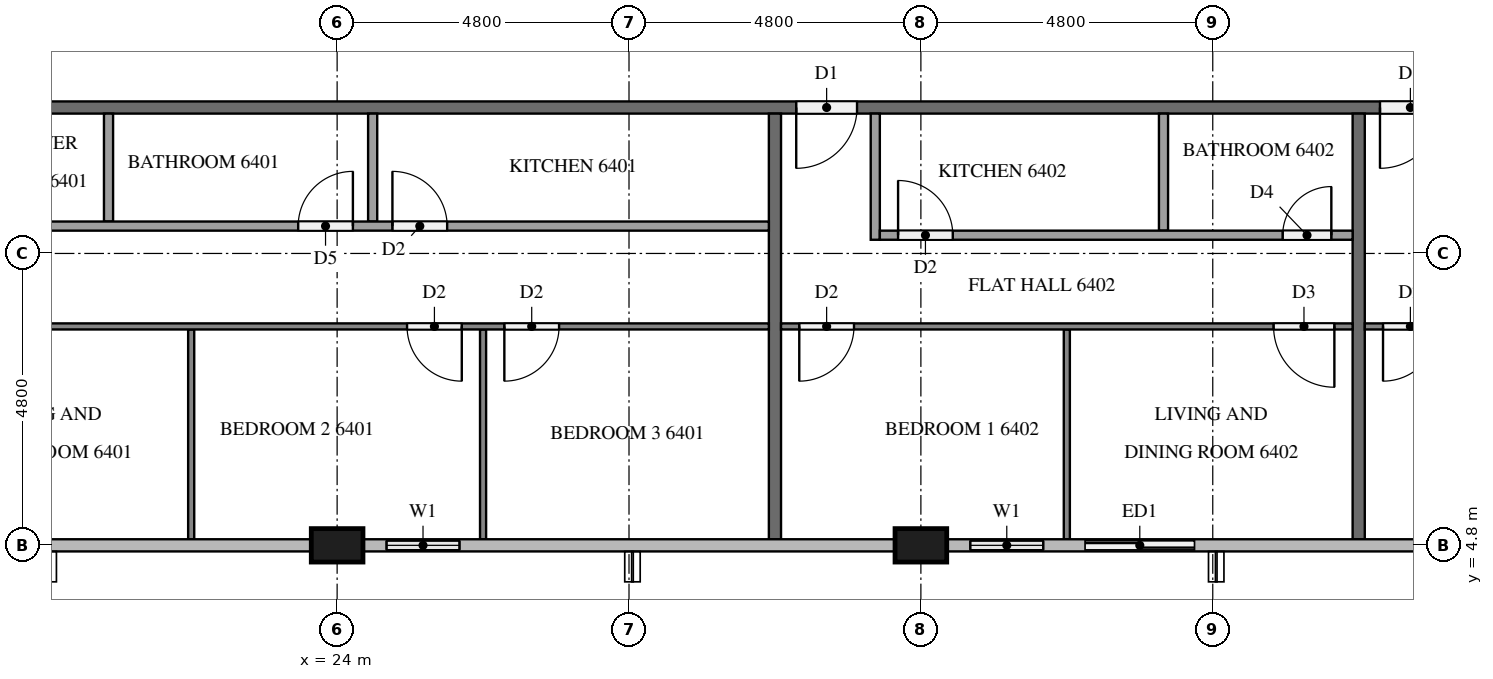
"""IFC4 building model, lengths in metres.
Left out: names, types, materials, properties, quantities, classifications, styles, units other than length and angle.
Written with IfcOpenShell. Run it as: python <this file> out.ifc"""

import sys

from ifc_helpers import new_model, si_unit, direction, frame, frame_2d, origin, origin_2d, place, context, subcontext, project, spatial, rectangle, extrude, element, fill, save


model = new_model("IFC4")
c1 = context("Model", 3, precision=1e-05, world=origin(), true_north=direction((0.0, 1.0)))
c2 = subcontext(c1, "Body", "Model", "MODEL_VIEW")
j1 = project(units=[si_unit("LENGTHUNIT", "METRE"), si_unit("PLANEANGLEUNIT", "RADIAN")], contexts=[c1])
p1 = place(None, origin())
s1 = spatial("IfcSite", under=j1, at=p1, CompositionType="ELEMENT")
p2 = place(p1, origin())
s2 = spatial("IfcBuilding", under=s1, at=p2, CompositionType="ELEMENT")
p3 = place(p2, frame((0.0, 0.0, 245.7)))
s3 = spatial("IfcBuildingStorey", under=s2, at=p3, CompositionType="ELEMENT", Elevation=245.7)
for number, where, z_axis, x_axis in (
    (1, (24.0, 4.8, 0.0), (0.0, 0.0, 1.0), (1.0, 0.0, 0.0)),
    (2, (33.6, 4.8, 0.0), (0.0, 0.0, 1.0), (1.0, 0.0, 0.0)),
):
    element("IfcColumn", number, at=place(p3, frame(where, z_axis=z_axis, x_axis=x_axis)), inside=s3, PredefinedType="COLUMN", context=c2, shape_type="SweptSolid", body=[
        extrude(rectangle(XDim=0.85, YDim=0.55, at=origin_2d()), origin(), (0.0, 0.0, 1.0), 3.2),
    ])
p4 = place(p3, frame((24.425, 4.8, 0.0), z_axis=(0.0, 0.0, 1.0), x_axis=(1.0, 0.0, 0.0)))
e3 = element("IfcWall", 3, at=p4, inside=s3, PredefinedType="SOLIDWALL", context=c2, shape_type="SweptSolid", body=[
    extrude(rectangle(XDim=1.975, YDim=0.15, at=frame_2d((0.987, 0.0))), origin(), (0.0, 0.0, 1.0), 3.2),
])
p5 = place(p4, frame((0.387, 0.0, 0.9)))
e4 = element("IfcOpeningElement", 4, at=p5, cuts=e3, PredefinedType="OPENING", context=c2, shape_type="SweptSolid", body=[
    extrude(rectangle(XDim=1.2, YDim=1.4, at=frame_2d((0.6, 0.7))), frame((0.0, 0.085, 0.0), z_axis=(0.0, -1.0, 0.0), x_axis=(1.0, 0.0, 0.0)), (0.0, 0.0, 1.0), 0.17),
])
p6 = place(p3, frame((34.025, 4.8, 0.0), z_axis=(0.0, 0.0, 1.0), x_axis=(1.0, 0.0, 0.0)))
e5 = element("IfcWall", 5, at=p6, inside=s3, PredefinedType="SOLIDWALL", context=c2, shape_type="SweptSolid", body=[
    extrude(rectangle(XDim=4.375, YDim=0.15, at=frame_2d((2.188, 0.0))), origin(), (0.0, 0.0, 1.0), 3.2),
])
p7 = place(p6, frame((0.387, 0.0, 0.9)))
e6 = element("IfcOpeningElement", 6, at=p7, cuts=e5, PredefinedType="OPENING", context=c2, shape_type="SweptSolid", body=[
    extrude(rectangle(XDim=1.2, YDim=1.4, at=frame_2d((0.6, 0.7))), frame((0.0, 0.085, 0.0), z_axis=(0.0, -1.0, 0.0), x_axis=(1.0, 0.0, 0.0)), (0.0, 0.0, 1.0), 0.17),
])
p8 = place(p6, frame((2.275, 0.0, 0.0)))
e7 = element("IfcOpeningElement", 7, at=p8, cuts=e5, PredefinedType="OPENING", context=c2, shape_type="SweptSolid", body=[
    extrude(rectangle(XDim=1.8, YDim=2.4, at=frame_2d((0.9, 1.2))), frame((0.0, 0.085, 0.0), z_axis=(0.0, -1.0, 0.0), x_axis=(1.0, 0.0, 0.0)), (0.0, 0.0, 1.0), 0.17),
])
p9 = place(p3, frame((50.5, 12.0, 0.0), z_axis=(0.0, 0.0, 1.0), x_axis=(-1.0, 0.0, 0.0)))
e8 = element("IfcWall", 8, at=p9, inside=s3, PredefinedType="PARTITIONING", context=c2, shape_type="SweptSolid", body=[
    extrude(rectangle(XDim=38.6, YDim=0.2, at=frame_2d((19.3, 0.0))), origin(), (0.0, 0.0, 1.0), 3.2),
])
p10 = place(p9, frame((37.1, 0.0, 0.0)))
e9 = element("IfcOpeningElement", 9, at=p10, cuts=e8, PredefinedType="OPENING", context=c2, shape_type="SweptSolid", body=[
    extrude(rectangle(XDim=1.1, YDim=2.1, at=frame_2d((0.55, 1.05))), frame((0.0, 0.11, 0.0), z_axis=(0.0, -1.0, 0.0), x_axis=(1.0, 0.0, 0.0)), (0.0, 0.0, 1.0), 0.22),
])
p11 = place(p9, frame((17.95, 0.0, 0.0)))
e10 = element("IfcOpeningElement", 10, at=p11, cuts=e8, PredefinedType="OPENING", context=c2, shape_type="SweptSolid", body=[
    extrude(rectangle(XDim=1.0, YDim=2.1, at=frame_2d((0.5, 1.05))), frame((0.0, 0.11, 0.0), z_axis=(0.0, -1.0, 0.0), x_axis=(1.0, 0.0, 0.0)), (0.0, 0.0, 1.0), 0.22),
])
p12 = place(p9, frame((8.35, 0.0, 0.0)))
e11 = element("IfcOpeningElement", 11, at=p12, cuts=e8, PredefinedType="OPENING", context=c2, shape_type="SweptSolid", body=[
    extrude(rectangle(XDim=1.0, YDim=2.1, at=frame_2d((0.5, 1.05))), frame((0.0, 0.11, 0.0), z_axis=(0.0, -1.0, 0.0), x_axis=(1.0, 0.0, 0.0)), (0.0, 0.0, 1.0), 0.22),
])
for number, where, z_axis, x_axis in (
    (12, (31.2, 11.9, 0.0), (0.0, 0.0, 1.0), (0.0, -1.0, 0.0)),
    (13, (40.8, 11.9, 0.0), (0.0, 0.0, 1.0), (0.0, -1.0, 0.0)),
):
    element("IfcWall", number, at=place(p3, frame(where, z_axis=z_axis, x_axis=x_axis)), inside=s3, PredefinedType="PARTITIONING", context=c2, shape_type="SweptSolid", body=[
        extrude(rectangle(XDim=7.0, YDim=0.2, at=frame_2d((3.5, 0.0))), origin(), (0.0, 0.0, 1.0), 3.2),
    ])
for number, where, z_axis, x_axis in (
    (14, (21.6, 8.35, 0.0), (0.0, 0.0, 1.0), (0.0, -1.0, 0.0)),
    (15, (26.4, 8.35, 0.0), (0.0, 0.0, 1.0), (0.0, -1.0, 0.0)),
):
    element("IfcWall", number, at=place(p3, frame(where, z_axis=z_axis, x_axis=x_axis)), inside=s3, PredefinedType="PARTITIONING", context=c2, shape_type="SweptSolid", body=[
        extrude(rectangle(XDim=3.45, YDim=0.1, at=frame_2d((1.725, 0.0))), origin(), (0.0, 0.0, 1.0), 3.2),
    ])
p13 = place(p3, frame((31.1, 8.4, 0.0), z_axis=(0.0, 0.0, 1.0), x_axis=(-1.0, 0.0, 0.0)))
e16 = element("IfcWall", 16, at=p13, inside=s3, PredefinedType="PARTITIONING", context=c2, shape_type="SweptSolid", body=[
    extrude(rectangle(XDim=19.0, YDim=0.1, at=frame_2d((9.5, 0.0))), origin(), (0.0, 0.0, 1.0), 3.2),
])
p14 = place(p13, frame((14.65, 0.0, 0.0)))
e17 = element("IfcOpeningElement", 17, at=p14, cuts=e16, PredefinedType="OPENING", context=c2, shape_type="SweptSolid", body=[
    extrude(rectangle(XDim=0.9, YDim=2.1, at=frame_2d((0.45, 1.05))), frame((0.0, 0.06, 0.0), z_axis=(0.0, -1.0, 0.0), x_axis=(1.0, 0.0, 0.0)), (0.0, 0.0, 1.0), 0.12),
])
p15 = place(p13, frame((12.95, 0.0, 0.0)))
e18 = element("IfcOpeningElement", 18, at=p15, cuts=e16, PredefinedType="OPENING", context=c2, shape_type="SweptSolid", body=[
    extrude(rectangle(XDim=1.0, YDim=2.1, at=frame_2d((0.5, 1.05))), frame((0.0, 0.06, 0.0), z_axis=(0.0, -1.0, 0.0), x_axis=(1.0, 0.0, 0.0)), (0.0, 0.0, 1.0), 0.12),
])
p16 = place(p13, frame((5.05, 0.0, 0.0)))
e19 = element("IfcOpeningElement", 19, at=p16, cuts=e16, PredefinedType="OPENING", context=c2, shape_type="SweptSolid", body=[
    extrude(rectangle(XDim=0.9, YDim=2.1, at=frame_2d((0.45, 1.05))), frame((0.0, 0.06, 0.0), z_axis=(0.0, -1.0, 0.0), x_axis=(1.0, 0.0, 0.0)), (0.0, 0.0, 1.0), 0.12),
])
p17 = place(p13, frame((3.45, 0.0, 0.0)))
e20 = element("IfcOpeningElement", 20, at=p17, cuts=e16, PredefinedType="OPENING", context=c2, shape_type="SweptSolid", body=[
    extrude(rectangle(XDim=0.9, YDim=2.1, at=frame_2d((0.45, 1.05))), frame((0.0, 0.06, 0.0), z_axis=(0.0, -1.0, 0.0), x_axis=(1.0, 0.0, 0.0)), (0.0, 0.0, 1.0), 0.12),
])
for number, where, z_axis, x_axis in (
    (21, (20.24, 11.9, 0.0), (0.0, 0.0, 1.0), (0.0, -1.0, 0.0)),
    (22, (24.584, 11.9, 0.0), (0.0, 0.0, 1.0), (0.0, -1.0, 0.0)),
):
    element("IfcWall", number, at=place(p3, frame(where, z_axis=z_axis, x_axis=x_axis)), inside=s3, PredefinedType="PARTITIONING", context=c2, shape_type="SweptSolid", body=[
        extrude(rectangle(XDim=1.775, YDim=0.15, at=frame_2d((0.887, 0.0))), origin(), (0.0, 0.0, 1.0), 3.2),
    ])
p18 = place(p3, frame((13.725, 10.05, 0.0), z_axis=(0.0, 0.0, 1.0), x_axis=(1.0, 0.0, 0.0)))
e23 = element("IfcWall", 23, at=p18, inside=s3, PredefinedType="PARTITIONING", context=c2, shape_type="SweptSolid", body=[
    extrude(rectangle(XDim=17.375, YDim=0.15, at=frame_2d((8.688, 0.0))), origin(), (0.0, 0.0, 1.0), 3.2),
])
p19 = place(p18, frame((2.133, 0.0, 0.0)))
e24 = element("IfcOpeningElement", 24, at=p19, cuts=e23, PredefinedType="OPENING", context=c2, shape_type="SweptSolid", body=[
    extrude(rectangle(XDim=0.8, YDim=2.1, at=frame_2d((0.4, 1.05))), frame((0.0, 0.085, 0.0), z_axis=(0.0, -1.0, 0.0), x_axis=(1.0, 0.0, 0.0)), (0.0, 0.0, 1.0), 0.17),
])
p20 = place(p18, frame((3.583, 0.0, 0.0)))
e25 = element("IfcOpeningElement", 25, at=p20, cuts=e23, PredefinedType="OPENING", context=c2, shape_type="SweptSolid", body=[
    extrude(rectangle(XDim=0.8, YDim=2.1, at=frame_2d((0.4, 1.05))), frame((0.0, 0.085, 0.0), z_axis=(0.0, -1.0, 0.0), x_axis=(1.0, 0.0, 0.0)), (0.0, 0.0, 1.0), 0.17),
])
p21 = place(p18, frame((9.635, 0.0, 0.0)))
e26 = element("IfcOpeningElement", 26, at=p21, cuts=e23, PredefinedType="OPENING", context=c2, shape_type="SweptSolid", body=[
    extrude(rectangle(XDim=0.9, YDim=2.1, at=frame_2d((0.45, 1.05))), frame((0.0, 0.085, 0.0), z_axis=(0.0, -1.0, 0.0), x_axis=(1.0, 0.0, 0.0)), (0.0, 0.0, 1.0), 0.17),
])
p22 = place(p18, frame((11.184, 0.0, 0.0)))
e27 = element("IfcOpeningElement", 27, at=p22, cuts=e23, PredefinedType="OPENING", context=c2, shape_type="SweptSolid", body=[
    extrude(rectangle(XDim=0.9, YDim=2.1, at=frame_2d((0.45, 1.05))), frame((0.0, 0.085, 0.0), z_axis=(0.0, -1.0, 0.0), x_axis=(1.0, 0.0, 0.0)), (0.0, 0.0, 1.0), 0.17),
])
p23 = place(p3, frame((36.0, 8.35, 0.0), z_axis=(0.0, 0.0, 1.0), x_axis=(0.0, -1.0, 0.0)))
e28 = element("IfcWall", 28, at=p23, inside=s3, PredefinedType="PARTITIONING", context=c2, shape_type="SweptSolid", body=[
    extrude(rectangle(XDim=3.45, YDim=0.1, at=frame_2d((1.725, 0.0))), origin(), (0.0, 0.0, 1.0), 3.2),
])
p24 = place(p3, frame((40.7, 8.4, 0.0), z_axis=(0.0, 0.0, 1.0), x_axis=(-1.0, 0.0, 0.0)))
e29 = element("IfcWall", 29, at=p24, inside=s3, PredefinedType="PARTITIONING", context=c2, shape_type="SweptSolid", body=[
    extrude(rectangle(XDim=9.4, YDim=0.1, at=frame_2d((4.7, 0.0))), origin(), (0.0, 0.0, 1.0), 3.2),
])
p25 = place(p24, frame((8.2, 0.0, 0.0)))
e30 = element("IfcOpeningElement", 30, at=p25, cuts=e29, PredefinedType="OPENING", context=c2, shape_type="SweptSolid", body=[
    extrude(rectangle(XDim=0.9, YDim=2.1, at=frame_2d((0.45, 1.05))), frame((0.0, 0.06, 0.0), z_axis=(0.0, -1.0, 0.0), x_axis=(1.0, 0.0, 0.0)), (0.0, 0.0, 1.0), 0.12),
])
p26 = place(p24, frame((0.3, 0.0, 0.0)))
e31 = element("IfcOpeningElement", 31, at=p26, cuts=e29, PredefinedType="OPENING", context=c2, shape_type="SweptSolid", body=[
    extrude(rectangle(XDim=1.0, YDim=2.1, at=frame_2d((0.5, 1.05))), frame((0.0, 0.06, 0.0), z_axis=(0.0, -1.0, 0.0), x_axis=(1.0, 0.0, 0.0)), (0.0, 0.0, 1.0), 0.12),
])
p27 = place(p3, frame((37.59, 11.9, 0.0), z_axis=(0.0, 0.0, 1.0), x_axis=(0.0, -1.0, 0.0)))
e32 = element("IfcWall", 32, at=p27, inside=s3, PredefinedType="PARTITIONING", context=c2, shape_type="SweptSolid", body=[
    extrude(rectangle(XDim=1.925, YDim=0.15, at=frame_2d((0.962, 0.0))), origin(), (0.0, 0.0, 1.0), 3.2),
])
p28 = place(p3, frame((32.85, 11.9, 0.0), z_axis=(0.0, 0.0, 1.0), x_axis=(0.0, -1.0, 0.0)))
e33 = element("IfcWall", 33, at=p28, inside=s3, PredefinedType="PARTITIONING", context=c2, shape_type="SweptSolid", body=[
    extrude(rectangle(XDim=2.075, YDim=0.15, at=frame_2d((1.038, 0.0))), origin(), (0.0, 0.0, 1.0), 3.2),
])
p29 = place(p3, frame((32.925, 9.9, 0.0), z_axis=(0.0, 0.0, 1.0), x_axis=(1.0, 0.0, 0.0)))
e34 = element("IfcWall", 34, at=p29, inside=s3, PredefinedType="PARTITIONING", context=c2, shape_type="SweptSolid", body=[
    extrude(rectangle(XDim=7.775, YDim=0.15, at=frame_2d((3.887, 0.0))), origin(), (0.0, 0.0, 1.0), 3.2),
])
p30 = place(p29, frame((0.3, 0.0, 0.0)))
e35 = element("IfcOpeningElement", 35, at=p30, cuts=e34, PredefinedType="OPENING", context=c2, shape_type="SweptSolid", body=[
    extrude(rectangle(XDim=0.9, YDim=2.1, at=frame_2d((0.45, 1.05))), frame((0.0, 0.085, 0.0), z_axis=(0.0, -1.0, 0.0), x_axis=(1.0, 0.0, 0.0)), (0.0, 0.0, 1.0), 0.17),
])
p31 = place(p29, frame((6.625, 0.0, 0.0)))
e36 = element("IfcOpeningElement", 36, at=p31, cuts=e34, PredefinedType="OPENING", context=c2, shape_type="SweptSolid", body=[
    extrude(rectangle(XDim=0.8, YDim=2.1, at=frame_2d((0.4, 1.05))), frame((0.0, 0.085, 0.0), z_axis=(0.0, -1.0, 0.0), x_axis=(1.0, 0.0, 0.0)), (0.0, 0.0, 1.0), 0.17),
])
p32 = place(p3, frame((57.178, 8.4, 0.0), z_axis=(0.0, 0.0, 1.0), x_axis=(-1.0, 0.0, 0.0)))
e37 = element("IfcWall", 37, at=p32, inside=s3, PredefinedType="PARTITIONING", context=c2, shape_type="SweptSolid", body=[
    extrude(rectangle(XDim=16.279, YDim=0.1, at=frame_2d((8.139, 0.0))), origin(), (0.0, 0.0, 1.0), 3.2),
])
p33 = place(p32, frame((15.079, 0.0, 0.0)))
e38 = element("IfcOpeningElement", 38, at=p33, cuts=e37, PredefinedType="OPENING", context=c2, shape_type="SweptSolid", body=[
    extrude(rectangle(XDim=0.9, YDim=2.1, at=frame_2d((0.45, 1.05))), frame((0.0, 0.06, 0.0), z_axis=(0.0, -1.0, 0.0), x_axis=(1.0, 0.0, 0.0)), (0.0, 0.0, 1.0), 0.12),
])
p34 = place(p32, frame((7.128, 0.0, 0.0)))
e39 = element("IfcOpeningElement", 39, at=p34, cuts=e37, PredefinedType="OPENING", context=c2, shape_type="SweptSolid", body=[
    extrude(rectangle(XDim=0.9, YDim=2.1, at=frame_2d((0.45, 1.05))), frame((0.0, 0.06, 0.0), z_axis=(0.0, -1.0, 0.0), x_axis=(1.0, 0.0, 0.0)), (0.0, 0.0, 1.0), 0.12),
])
p35 = place(p32, frame((5.428, 0.0, 0.0)))
e40 = element("IfcOpeningElement", 40, at=p35, cuts=e37, PredefinedType="OPENING", context=c2, shape_type="SweptSolid", body=[
    extrude(rectangle(XDim=1.0, YDim=2.1, at=frame_2d((0.5, 1.05))), frame((0.0, 0.06, 0.0), z_axis=(0.0, -1.0, 0.0), x_axis=(1.0, 0.0, 0.0)), (0.0, 0.0, 1.0), 0.12),
])
p36 = place(p5, origin())
e41 = element("IfcWindow", 41, at=p36, inside=s3, PartitioningType="SINGLE_PANEL", PredefinedType="WINDOW", context=c2, shape_type="SweptSolid", body=[
    extrude(rectangle(XDim=1.2, YDim=1.4, at=frame_2d((0.6, 0.7))), frame((0.0, 0.03, 0.0), z_axis=(0.0, -1.0, 0.0), x_axis=(1.0, 0.0, 0.0)), (0.0, 0.0, 1.0), 0.06),
])
fill(e4, e41)
p37 = place(p7, origin())
e42 = element("IfcWindow", 42, at=p37, inside=s3, PartitioningType="SINGLE_PANEL", PredefinedType="WINDOW", context=c2, shape_type="SweptSolid", body=[
    extrude(rectangle(XDim=1.2, YDim=1.4, at=frame_2d((0.6, 0.7))), frame((0.0, 0.03, 0.0), z_axis=(0.0, -1.0, 0.0), x_axis=(1.0, 0.0, 0.0)), (0.0, 0.0, 1.0), 0.06),
])
fill(e6, e42)
p38 = place(p8, origin())
e43 = element("IfcDoor", 43, at=p38, inside=s3, OperationType="SLIDING_TO_RIGHT", PredefinedType="DOOR", context=c2, shape_type="SweptSolid", body=[
    extrude(rectangle(XDim=1.8, YDim=2.4, at=frame_2d((0.9, 1.2))), frame((0.0, 0.025, 0.0), z_axis=(0.0, -1.0, 0.0), x_axis=(1.0, 0.0, 0.0)), (0.0, 0.0, 1.0), 0.05),
])
fill(e7, e43)
p39 = place(p11, origin())
e44 = element("IfcDoor", 44, at=p39, inside=s3, OperationType="SINGLE_SWING_RIGHT", PredefinedType="DOOR", context=c2, shape_type="SweptSolid", body=[
    extrude(rectangle(XDim=1.0, YDim=2.1, at=frame_2d((0.5, 1.05))), frame((0.0, 0.025, 0.0), z_axis=(0.0, -1.0, 0.0), x_axis=(1.0, 0.0, 0.0)), (0.0, 0.0, 1.0), 0.05),
])
fill(e10, e44)
p40 = place(p12, origin())
e45 = element("IfcDoor", 45, at=p40, inside=s3, OperationType="SINGLE_SWING_RIGHT", PredefinedType="DOOR", context=c2, shape_type="SweptSolid", body=[
    extrude(rectangle(XDim=1.0, YDim=2.1, at=frame_2d((0.5, 1.05))), frame((0.0, 0.025, 0.0), z_axis=(0.0, -1.0, 0.0), x_axis=(1.0, 0.0, 0.0)), (0.0, 0.0, 1.0), 0.05),
])
fill(e11, e45)
p41 = place(p16, origin())
e46 = element("IfcDoor", 46, at=p41, inside=s3, OperationType="SINGLE_SWING_LEFT", PredefinedType="DOOR", context=c2, shape_type="SweptSolid", body=[
    extrude(rectangle(XDim=0.9, YDim=2.1, at=frame_2d((0.45, 1.05))), frame((0.0, 0.025, 0.0), z_axis=(0.0, -1.0, 0.0), x_axis=(1.0, 0.0, 0.0)), (0.0, 0.0, 1.0), 0.05),
])
fill(e19, e46)
p42 = place(p17, origin())
e47 = element("IfcDoor", 47, at=p42, inside=s3, OperationType="SINGLE_SWING_RIGHT", PredefinedType="DOOR", context=c2, shape_type="SweptSolid", body=[
    extrude(rectangle(XDim=0.9, YDim=2.1, at=frame_2d((0.45, 1.05))), frame((0.0, 0.025, 0.0), z_axis=(0.0, -1.0, 0.0), x_axis=(1.0, 0.0, 0.0)), (0.0, 0.0, 1.0), 0.05),
])
fill(e20, e47)
p43 = place(p21, origin())
e48 = element("IfcDoor", 48, at=p43, inside=s3, OperationType="SINGLE_SWING_RIGHT", PredefinedType="DOOR", context=c2, shape_type="SweptSolid", body=[
    extrude(rectangle(XDim=0.9, YDim=2.1, at=frame_2d((0.45, 1.05))), frame((0.0, 0.025, 0.0), z_axis=(0.0, -1.0, 0.0), x_axis=(1.0, 0.0, 0.0)), (0.0, 0.0, 1.0), 0.05),
])
fill(e26, e48)
p44 = place(p22, origin())
e49 = element("IfcDoor", 49, at=p44, inside=s3, OperationType="SINGLE_SWING_LEFT", PredefinedType="DOOR", context=c2, shape_type="SweptSolid", body=[
    extrude(rectangle(XDim=0.9, YDim=2.1, at=frame_2d((0.45, 1.05))), frame((0.0, 0.025, 0.0), z_axis=(0.0, -1.0, 0.0), x_axis=(1.0, 0.0, 0.0)), (0.0, 0.0, 1.0), 0.05),
])
fill(e27, e49)
p45 = place(p25, origin())
e50 = element("IfcDoor", 50, at=p45, inside=s3, OperationType="SINGLE_SWING_RIGHT", PredefinedType="DOOR", context=c2, shape_type="SweptSolid", body=[
    extrude(rectangle(XDim=0.9, YDim=2.1, at=frame_2d((0.45, 1.05))), frame((0.0, 0.025, 0.0), z_axis=(0.0, -1.0, 0.0), x_axis=(1.0, 0.0, 0.0)), (0.0, 0.0, 1.0), 0.05),
])
fill(e30, e50)
p46 = place(p26, origin())
e51 = element("IfcDoor", 51, at=p46, inside=s3, OperationType="SINGLE_SWING_LEFT", PredefinedType="DOOR", context=c2, shape_type="SweptSolid", body=[
    extrude(rectangle(XDim=1.0, YDim=2.1, at=frame_2d((0.5, 1.05))), frame((0.0, 0.025, 0.0), z_axis=(0.0, -1.0, 0.0), x_axis=(1.0, 0.0, 0.0)), (0.0, 0.0, 1.0), 0.05),
])
fill(e31, e51)
p47 = place(p30, origin())
e52 = element("IfcDoor", 52, at=p47, inside=s3, OperationType="SINGLE_SWING_LEFT", PredefinedType="DOOR", context=c2, shape_type="SweptSolid", body=[
    extrude(rectangle(XDim=0.9, YDim=2.1, at=frame_2d((0.45, 1.05))), frame((0.0, 0.025, 0.0), z_axis=(0.0, -1.0, 0.0), x_axis=(1.0, 0.0, 0.0)), (0.0, 0.0, 1.0), 0.05),
])
fill(e35, e52)
p48 = place(p31, origin())
e53 = element("IfcDoor", 53, at=p48, inside=s3, OperationType="SINGLE_SWING_RIGHT", PredefinedType="DOOR", context=c2, shape_type="SweptSolid", body=[
    extrude(rectangle(XDim=0.8, YDim=2.1, at=frame_2d((0.4, 1.05))), frame((0.0, 0.025, 0.0), z_axis=(0.0, -1.0, 0.0), x_axis=(1.0, 0.0, 0.0)), (0.0, 0.0, 1.0), 0.05),
])
fill(e36, e53)
p49 = place(p33, origin())
e54 = element("IfcDoor", 54, at=p49, inside=s3, OperationType="SINGLE_SWING_RIGHT", PredefinedType="DOOR", context=c2, shape_type="SweptSolid", body=[
    extrude(rectangle(XDim=0.9, YDim=2.1, at=frame_2d((0.45, 1.05))), frame((0.0, 0.025, 0.0), z_axis=(0.0, -1.0, 0.0), x_axis=(1.0, 0.0, 0.0)), (0.0, 0.0, 1.0), 0.05),
])
fill(e38, e54)
save(model, sys.argv[1])
